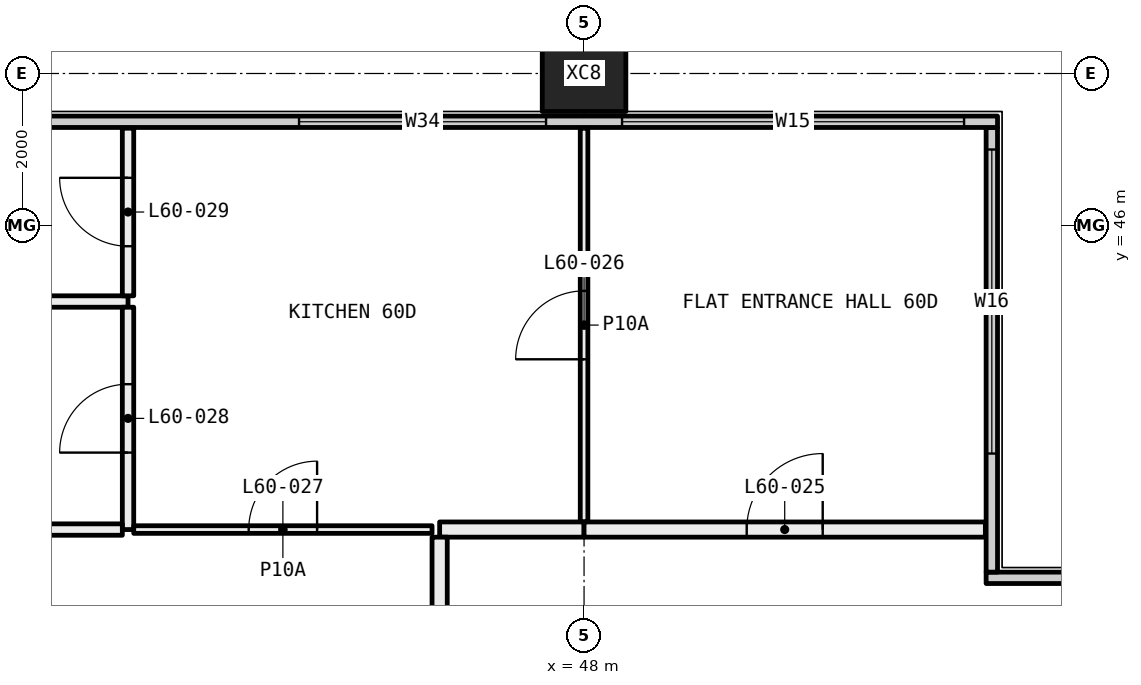
"""IFC4 building model, lengths in metres.
Left out: names, types, materials, properties, quantities, classifications, styles, units other than length and angle.
Written with IfcOpenShell. Run it as: python <this file> out.ifc"""

import sys

from ifc_helpers import new_model, si_unit, direction, frame, frame_2d, origin, origin_2d, place, context, subcontext, project, spatial, rectangle, hollow_rectangle, extrude, element, fill, save


model = new_model("IFC4")
c1 = context("Model", 3, precision=1e-05, world=origin(), true_north=direction((0.0, 1.0)))
c2 = subcontext(c1, "Body", "Model", "MODEL_VIEW")
j1 = project(units=[si_unit("LENGTHUNIT", "METRE"), si_unit("PLANEANGLEUNIT", "RADIAN")], contexts=[c1])
p1 = place(None, origin())
s1 = spatial("IfcSite", under=j1, at=p1, CompositionType="ELEMENT")
p2 = place(p1, origin())
s2 = spatial("IfcBuilding", under=s1, at=p2, CompositionType="ELEMENT")
p3 = place(p2, frame((0.0, 0.0, 224.85)))
s3 = spatial("IfcBuildingStorey", under=s2, at=p3, CompositionType="ELEMENT", Elevation=224.85)
p4 = place(p3, frame((48.0, 48.0, -0.4), z_axis=(0.0, 0.0, 1.0), x_axis=(1.0, 0.0, 0.0)))
e1 = element("IfcColumn", 1, at=p4, inside=s3, PredefinedType="COLUMN", context=c2, shape_type="SweptSolid", body=[
    extrude(hollow_rectangle(XDim=1.1, YDim=1.0, WallThickness=0.04, at=origin_2d()), origin(), (0.0, 0.0, 1.0), 3.45),
])
p5 = place(p3, frame((53.29, 41.365, 0.0), z_axis=(0.0, 0.0, 1.0), x_axis=(1.0, 0.0, 0.0)))
e2 = element("IfcWall", 2, at=p5, inside=s3, PredefinedType="ELEMENTEDWALL", context=c2, shape_type="SweptSolid", body=[
    extrude(rectangle(XDim=6.15, YDim=0.15, at=frame_2d((3.075, 0.0))), origin(), (0.0, 0.0, 1.0), 3.05),
])
p6 = place(p5, frame((1.71, 0.0, 0.45)))
e3 = element("IfcOpeningElement", 3, at=p6, cuts=e2, PredefinedType="OPENING", context=c2, shape_type="SweptSolid", body=[
    extrude(rectangle(XDim=4.0, YDim=2.55, at=frame_2d((2.0, 1.275))), frame((0.0, 0.085, 0.0), z_axis=(0.0, -1.0, 0.0), x_axis=(1.0, 0.0, 0.0)), (0.0, 0.0, 1.0), 0.17),
])
p7 = place(p3, frame((53.365, 41.44, 0.0), z_axis=(0.0, 0.0, 1.0), x_axis=(0.0, 1.0, 0.0)))
e4 = element("IfcWall", 4, at=p7, inside=s3, PredefinedType="ELEMENTEDWALL", context=c2, shape_type="SweptSolid", body=[
    extrude(rectangle(XDim=5.85, YDim=0.15, at=frame_2d((2.925, 0.0))), origin(), (0.0, 0.0, 1.0), 3.05),
])
p8 = place(p7, frame((1.56, 0.0, 0.45)))
e5 = element("IfcOpeningElement", 5, at=p8, cuts=e4, PredefinedType="OPENING", context=c2, shape_type="SweptSolid", body=[
    extrude(rectangle(XDim=4.0, YDim=2.55, at=frame_2d((2.0, 1.275))), frame((0.0, 0.085, 0.0), z_axis=(0.0, -1.0, 0.0), x_axis=(1.0, 0.0, 0.0)), (0.0, 0.0, 1.0), 0.17),
])
p9 = place(p3, frame((18.56, 47.365, 0.0), z_axis=(0.0, 0.0, 1.0), x_axis=(1.0, 0.0, 0.0)))
e6 = element("IfcWall", 6, at=p9, inside=s3, PredefinedType="ELEMENTEDWALL", context=c2, shape_type="SweptSolid", body=[
    extrude(rectangle(XDim=34.88, YDim=0.15, at=frame_2d((17.44, 0.0))), origin(), (0.0, 0.0, 1.0), 3.05),
])
p10 = place(p9, frame((0.44, 0.0, 0.45)))
e7 = element("IfcOpeningElement", 7, at=p10, cuts=e6, PredefinedType="OPENING", context=c2, shape_type="SweptSolid", body=[
    extrude(rectangle(XDim=4.5, YDim=2.55, at=frame_2d((2.25, 1.275))), frame((0.0, 0.085, 0.0), z_axis=(0.0, -1.0, 0.0), x_axis=(1.0, 0.0, 0.0)), (0.0, 0.0, 1.0), 0.17),
])
p11 = place(p9, frame((5.94, 0.0, 0.45)))
e8 = element("IfcOpeningElement", 8, at=p11, cuts=e6, PredefinedType="OPENING", context=c2, shape_type="SweptSolid", body=[
    extrude(rectangle(XDim=3.25, YDim=2.55, at=frame_2d((1.625, 1.275))), frame((0.0, 0.085, 0.0), z_axis=(0.0, -1.0, 0.0), x_axis=(1.0, 0.0, 0.0)), (0.0, 0.0, 1.0), 0.17),
])
p12 = place(p9, frame((14.94, 0.0, 0.45)))
e9 = element("IfcOpeningElement", 9, at=p12, cuts=e6, PredefinedType="OPENING", context=c2, shape_type="SweptSolid", body=[
    extrude(rectangle(XDim=2.0, YDim=2.55, at=frame_2d((1.0, 1.275))), frame((0.0, 0.085, 0.0), z_axis=(0.0, -1.0, 0.0), x_axis=(1.0, 0.0, 0.0)), (0.0, 0.0, 1.0), 0.17),
])
p13 = place(p9, frame((17.94, 0.0, 0.45)))
e10 = element("IfcOpeningElement", 10, at=p13, cuts=e6, PredefinedType="OPENING", context=c2, shape_type="SweptSolid", body=[
    extrude(rectangle(XDim=3.25, YDim=2.55, at=frame_2d((1.625, 1.275))), frame((0.0, 0.085, 0.0), z_axis=(0.0, -1.0, 0.0), x_axis=(1.0, 0.0, 0.0)), (0.0, 0.0, 1.0), 0.17),
])
p14 = place(p9, frame((25.69, 0.0, 0.45)))
e11 = element("IfcOpeningElement", 11, at=p14, cuts=e6, PredefinedType="OPENING", context=c2, shape_type="SweptSolid", body=[
    extrude(rectangle(XDim=3.25, YDim=2.55, at=frame_2d((1.625, 1.275))), frame((0.0, 0.085, 0.0), z_axis=(0.0, -1.0, 0.0), x_axis=(1.0, 0.0, 0.0)), (0.0, 0.0, 1.0), 0.17),
])
p15 = place(p9, frame((29.94, 0.0, 0.45)))
e12 = element("IfcOpeningElement", 12, at=p15, cuts=e6, PredefinedType="OPENING", context=c2, shape_type="SweptSolid", body=[
    extrude(rectangle(XDim=4.5, YDim=2.55, at=frame_2d((2.25, 1.275))), frame((0.0, 0.085, 0.0), z_axis=(0.0, -1.0, 0.0), x_axis=(1.0, 0.0, 0.0)), (0.0, 0.0, 1.0), 0.17),
])
p16 = place(p3, frame((42.0, 45.0, 0.0), z_axis=(0.0, 0.0, 1.0), x_axis=(-1.0, 0.0, 0.0)))
e13 = element("IfcWall", 13, at=p16, inside=s3, PredefinedType="PARTITIONING", context=c2, shape_type="SweptSolid", body=[
    extrude(rectangle(XDim=5.9, YDim=0.15, at=frame_2d((2.95, 0.0))), origin(), (0.0, 0.0, 1.0), 3.05),
])
p17 = place(p3, frame((42.0, 42.0, 0.0), z_axis=(0.0, 0.0, 1.0), x_axis=(0.0, 1.0, 0.0)))
e14 = element("IfcWall", 14, at=p17, inside=s3, PredefinedType="PARTITIONING", context=c2, shape_type="SweptSolid", body=[
    extrude(rectangle(XDim=2.925, YDim=0.15, at=frame_2d((1.462, 0.0))), origin(), (0.0, 0.0, 1.0), 3.05),
])
p18 = place(p17, frame((1.012, 0.0, 0.0)))
e15 = element("IfcOpeningElement", 15, at=p18, cuts=e14, PredefinedType="OPENING", context=c2, shape_type="SweptSolid", body=[
    extrude(rectangle(XDim=0.9, YDim=2.1, at=frame_2d((0.45, 1.05))), frame((0.0, 0.085, 0.0), z_axis=(0.0, -1.0, 0.0), x_axis=(1.0, 0.0, 0.0)), (0.0, 0.0, 1.0), 0.17),
])
p19 = place(p3, frame((40.9, 42.0, 0.0), z_axis=(0.0, 0.0, 1.0), x_axis=(1.0, 0.0, 0.0)))
e16 = element("IfcWall", 16, at=p19, inside=s3, PredefinedType="PARTITIONING", context=c2, shape_type="SweptSolid", body=[
    extrude(rectangle(XDim=1.025, YDim=0.15, at=frame_2d((0.513, 0.0))), origin(), (0.0, 0.0, 1.0), 3.05),
])
p20 = place(p3, frame((42.0, 45.075, 0.0), z_axis=(0.0, 0.0, 1.0), x_axis=(0.0, 1.0, 0.0)))
e17 = element("IfcWall", 17, at=p20, inside=s3, PredefinedType="PARTITIONING", context=c2, shape_type="SweptSolid", body=[
    extrude(rectangle(XDim=2.205, YDim=0.15, at=frame_2d((1.103, 0.0))), origin(), (0.0, 0.0, 1.0), 3.05),
])
p21 = place(p20, frame((0.653, 0.0, 0.0)))
e18 = element("IfcOpeningElement", 18, at=p21, cuts=e17, PredefinedType="OPENING", context=c2, shape_type="SweptSolid", body=[
    extrude(rectangle(XDim=0.9, YDim=2.1, at=frame_2d((0.45, 1.05))), frame((0.0, 0.085, 0.0), z_axis=(0.0, -1.0, 0.0), x_axis=(1.0, 0.0, 0.0)), (0.0, 0.0, 1.0), 0.17),
])
p22 = place(p3, frame((48.0, 42.1, 0.0), z_axis=(0.0, 0.0, 1.0), x_axis=(0.0, 1.0, 0.0)))
e19 = element("IfcWall", 19, at=p22, inside=s3, PredefinedType="PARTITIONING", context=c2, shape_type="SweptSolid", body=[
    extrude(rectangle(XDim=5.18, YDim=0.1, at=frame_2d((2.59, 0.0))), origin(), (0.0, 0.0, 1.0), 3.05),
])
p23 = place(p22, frame((2.14, 0.0, 0.0)))
e20 = element("IfcOpeningElement", 20, at=p23, cuts=e19, PredefinedType="OPENING", context=c2, shape_type="SweptSolid", body=[
    extrude(rectangle(XDim=0.9, YDim=2.1, at=frame_2d((0.45, 1.05))), frame((0.0, 0.06, 0.0), z_axis=(0.0, -1.0, 0.0), x_axis=(1.0, 0.0, 0.0)), (0.0, 0.0, 1.0), 0.12),
])
p24 = place(p3, frame((42.075, 42.0, 0.0), z_axis=(0.0, 0.0, 1.0), x_axis=(1.0, 0.0, 0.0)))
e21 = element("IfcWall", 21, at=p24, inside=s3, PredefinedType="PARTITIONING", context=c2, shape_type="SweptSolid", body=[
    extrude(rectangle(XDim=3.925, YDim=0.1, at=frame_2d((1.962, 0.0))), origin(), (0.0, 0.0, 1.0), 3.05),
])
p25 = place(p24, frame((1.512, 0.0, 0.0)))
e22 = element("IfcOpeningElement", 22, at=p25, cuts=e21, PredefinedType="OPENING", context=c2, shape_type="SweptSolid", body=[
    extrude(rectangle(XDim=0.9, YDim=2.1, at=frame_2d((0.45, 1.05))), frame((0.0, 0.06, 0.0), z_axis=(0.0, -1.0, 0.0), x_axis=(1.0, 0.0, 0.0)), (0.0, 0.0, 1.0), 0.12),
])
p26 = place(p3, frame((46.1, 42.0, 0.0), z_axis=(0.0, 0.0, 1.0), x_axis=(1.0, 0.0, 0.0)))
e23 = element("IfcWall", 23, at=p26, inside=s3, PredefinedType="PARTITIONING", context=c2, shape_type="SweptSolid", body=[
    extrude(rectangle(XDim=1.9, YDim=0.2, at=frame_2d((0.95, 0.0))), origin(), (0.0, 0.0, 1.0), 3.05),
])
p27 = place(p3, frame((48.0, 42.0, 0.0), z_axis=(0.0, 0.0, 1.0), x_axis=(1.0, 0.0, 0.0)))
e24 = element("IfcWall", 24, at=p27, inside=s3, PredefinedType="PARTITIONING", context=c2, shape_type="SweptSolid", body=[
    extrude(rectangle(XDim=5.28, YDim=0.2, at=frame_2d((2.64, 0.0))), origin(), (0.0, 0.0, 1.0), 3.05),
])
p28 = place(p27, frame((2.14, 0.0, 0.0)))
e25 = element("IfcOpeningElement", 25, at=p28, cuts=e24, PredefinedType="OPENING", context=c2, shape_type="SweptSolid", body=[
    extrude(rectangle(XDim=1.0, YDim=2.1, at=frame_2d((0.5, 1.05))), frame((0.0, 0.11, 0.0), z_axis=(0.0, -1.0, 0.0), x_axis=(1.0, 0.0, 0.0)), (0.0, 0.0, 1.0), 0.22),
])
p29 = place(p3, frame((46.1, 36.0, 0.0), z_axis=(0.0, 0.0, 1.0), x_axis=(0.0, 1.0, 0.0)))
e26 = element("IfcWall", 26, at=p29, inside=s3, PredefinedType="PARTITIONING", context=c2, shape_type="SweptSolid", body=[
    extrude(rectangle(XDim=5.9, YDim=0.2, at=frame_2d((2.95, 0.0))), origin(), (0.0, 0.0, 1.0), 2.45),
])
p30 = place(p8, origin())
e27 = element("IfcWindow", 27, at=p30, inside=s3, PartitioningType="SINGLE_PANEL", PredefinedType="WINDOW", context=c2, shape_type="SweptSolid", body=[
    extrude(rectangle(XDim=4.0, YDim=2.55, at=frame_2d((2.0, 1.275))), frame((0.0, 0.03, 0.0), z_axis=(0.0, -1.0, 0.0), x_axis=(1.0, 0.0, 0.0)), (0.0, 0.0, 1.0), 0.06),
])
fill(e5, e27)
p31 = place(p14, origin())
e28 = element("IfcWindow", 28, at=p31, inside=s3, PartitioningType="SINGLE_PANEL", PredefinedType="WINDOW", context=c2, shape_type="SweptSolid", body=[
    extrude(rectangle(XDim=3.25, YDim=2.55, at=frame_2d((1.625, 1.275))), frame((0.0, 0.03, 0.0), z_axis=(0.0, -1.0, 0.0), x_axis=(1.0, 0.0, 0.0)), (0.0, 0.0, 1.0), 0.06),
])
fill(e11, e28)
p32 = place(p15, origin())
e29 = element("IfcWindow", 29, at=p32, inside=s3, PartitioningType="SINGLE_PANEL", PredefinedType="WINDOW", context=c2, shape_type="SweptSolid", body=[
    extrude(rectangle(XDim=4.5, YDim=2.55, at=frame_2d((2.25, 1.275))), frame((0.0, 0.03, 0.0), z_axis=(0.0, -1.0, 0.0), x_axis=(1.0, 0.0, 0.0)), (0.0, 0.0, 1.0), 0.06),
])
fill(e12, e29)
p33 = place(p28, origin())
e30 = element("IfcDoor", 30, at=p33, inside=s3, OperationType="SINGLE_SWING_LEFT", PredefinedType="DOOR", context=c2, shape_type="SweptSolid", body=[
    extrude(rectangle(XDim=1.0, YDim=2.1, at=frame_2d((0.5, 1.05))), frame((0.0, 0.025, 0.0), z_axis=(0.0, -1.0, 0.0), x_axis=(1.0, 0.0, 0.0)), (0.0, 0.0, 1.0), 0.05),
])
fill(e25, e30)
p34 = place(p23, origin())
e31 = element("IfcDoor", 31, at=p34, inside=s3, OperationType="SINGLE_SWING_RIGHT", PredefinedType="DOOR", context=c2, shape_type="SweptSolid", body=[
    extrude(rectangle(XDim=0.9, YDim=2.1, at=frame_2d((0.45, 1.05))), frame((0.0, 0.025, 0.0), z_axis=(0.0, -1.0, 0.0), x_axis=(1.0, 0.0, 0.0)), (0.0, 0.0, 1.0), 0.05),
])
fill(e20, e31)
p35 = place(p25, origin())
e32 = element("IfcDoor", 32, at=p35, inside=s3, OperationType="SINGLE_SWING_LEFT", PredefinedType="DOOR", context=c2, shape_type="SweptSolid", body=[
    extrude(rectangle(XDim=0.9, YDim=2.1, at=frame_2d((0.45, 1.05))), frame((0.0, 0.025, 0.0), z_axis=(0.0, -1.0, 0.0), x_axis=(1.0, 0.0, 0.0)), (0.0, 0.0, 1.0), 0.05),
])
fill(e22, e32)
p36 = place(p18, origin())
e33 = element("IfcDoor", 33, at=p36, inside=s3, OperationType="SINGLE_SWING_RIGHT", PredefinedType="DOOR", context=c2, shape_type="SweptSolid", body=[
    extrude(rectangle(XDim=0.9, YDim=2.1, at=frame_2d((0.45, 1.05))), frame((0.0, 0.025, 0.0), z_axis=(0.0, -1.0, 0.0), x_axis=(1.0, 0.0, 0.0)), (0.0, 0.0, 1.0), 0.05),
])
fill(e15, e33)
p37 = place(p21, origin())
e34 = element("IfcDoor", 34, at=p37, inside=s3, OperationType="SINGLE_SWING_LEFT", PredefinedType="DOOR", context=c2, shape_type="SweptSolid", body=[
    extrude(rectangle(XDim=0.9, YDim=2.1, at=frame_2d((0.45, 1.05))), frame((0.0, 0.025, 0.0), z_axis=(0.0, -1.0, 0.0), x_axis=(1.0, 0.0, 0.0)), (0.0, 0.0, 1.0), 0.05),
])
fill(e18, e34)
save(model, sys.argv[1])
